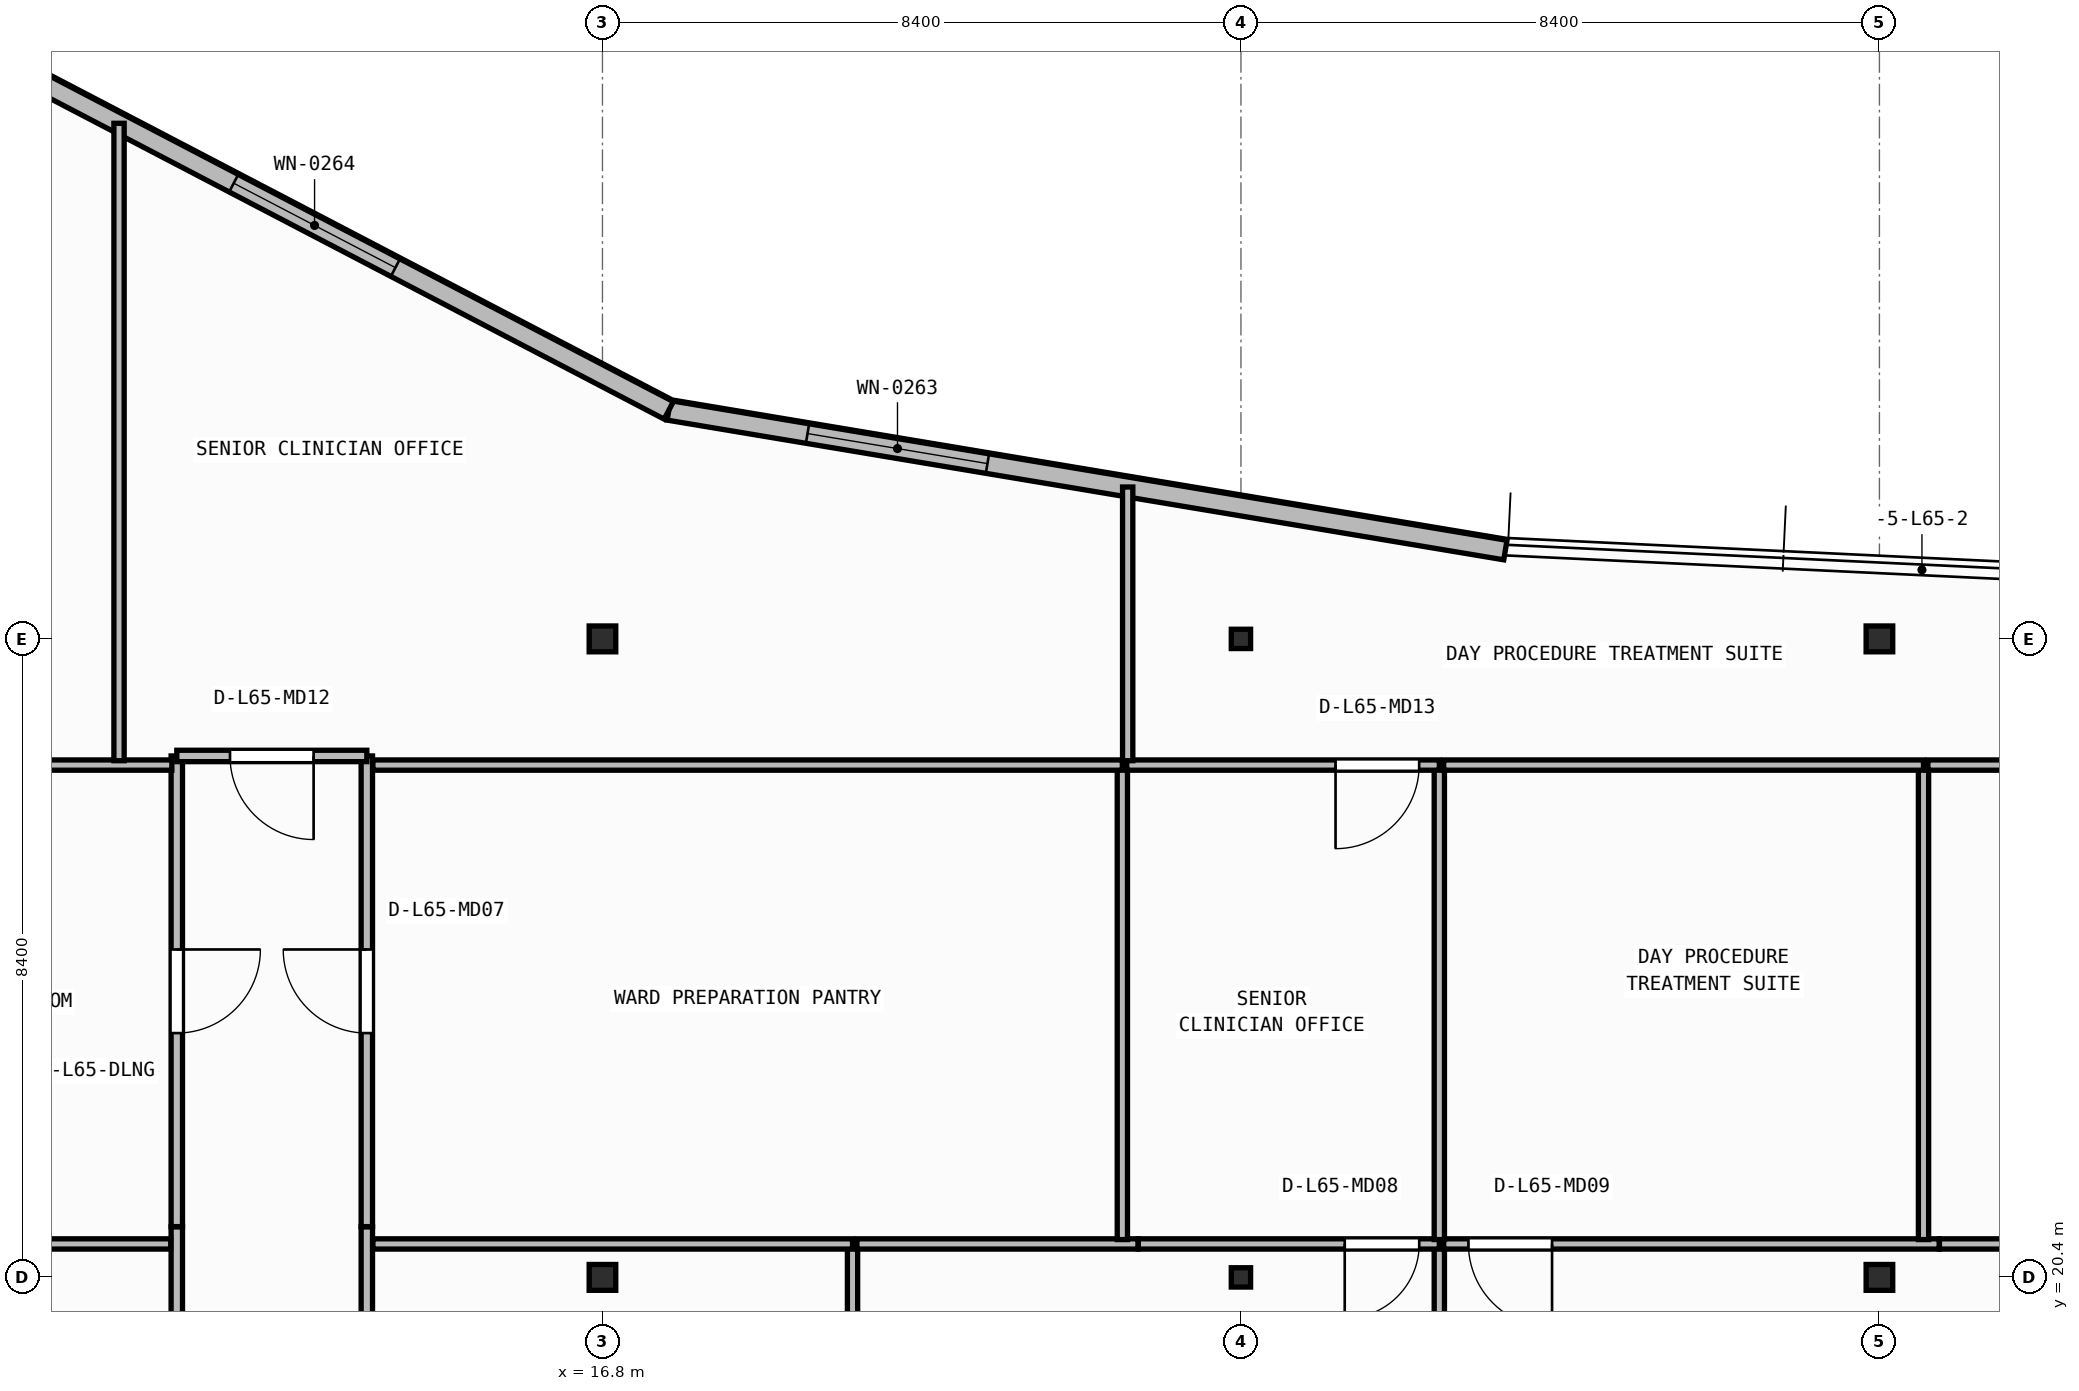
"""IFC4 building model, lengths in metres.
Left out: names, types, materials, properties, quantities, classifications, styles, units other than length and angle.
Written with IfcOpenShell. Run it as: python <this file> out.ifc"""

import sys

from ifc_helpers import new_model, si_unit, direction, frame, frame_2d, origin, origin_2d, place, context, subcontext, project, spatial, rectangle, i_section, extrude, element, fill, save


model = new_model("IFC4")
c1 = context("Model", 3, precision=1e-05, world=origin(), true_north=direction((0.0, 1.0)))
c2 = subcontext(c1, "Body", "Model", "MODEL_VIEW")
j1 = project(units=[si_unit("LENGTHUNIT", "METRE"), si_unit("PLANEANGLEUNIT", "RADIAN")], contexts=[c1])
p1 = place(None, origin())
s1 = spatial("IfcSite", under=j1, at=p1, CompositionType="ELEMENT")
p2 = place(p1, origin())
s2 = spatial("IfcBuilding", under=s1, at=p2, CompositionType="ELEMENT")
p3 = place(p2, frame((0.0, 0.0, 264.45)))
s3 = spatial("IfcBuildingStorey", under=s2, at=p3, CompositionType="ELEMENT", Elevation=264.45)
p4 = place(p3, frame((16.8, 20.4, 0.0), z_axis=(0.0, 0.0, 1.0), x_axis=(1.0, 0.0, 0.0)))
e1 = element("IfcColumn", 1, at=p4, inside=s3, PredefinedType="COLUMN", context=c2, shape_type="SweptSolid", body=[
    extrude(i_section(OverallWidth=0.35, OverallDepth=0.34, WebThickness=0.016, FlangeThickness=0.028, at=origin_2d()), origin(), (0.0, 0.0, 1.0), 3.95),
])
p5 = place(p3, frame((25.2, 20.4, 0.0), z_axis=(0.0, 0.0, 1.0), x_axis=(1.0, 0.0, 0.0)))
e2 = element("IfcColumn", 2, at=p5, inside=s3, PredefinedType="COLUMN", context=c2, shape_type="SweptSolid", body=[
    extrude(i_section(OverallWidth=0.254, OverallDepth=0.254, WebThickness=0.009, FlangeThickness=0.014, FilletRadius=0.013, at=origin_2d()), origin(), (0.0, 0.0, 1.0), 3.95),
])
for number, where, z_axis, x_axis in (
    (3, (33.6, 20.4, 0.0), (0.0, 0.0, 1.0), (1.0, 0.0, 0.0)),
    (4, (16.8, 28.8, 0.0), (0.0, 0.0, 1.0), (1.0, 0.0, 0.0)),
):
    element("IfcColumn", number, at=place(p3, frame(where, z_axis=z_axis, x_axis=x_axis)), inside=s3, PredefinedType="COLUMN", context=c2, shape_type="SweptSolid", body=[
        extrude(i_section(OverallWidth=0.35, OverallDepth=0.34, WebThickness=0.016, FlangeThickness=0.028, at=origin_2d()), origin(), (0.0, 0.0, 1.0), 3.95),
    ])
p6 = place(p3, frame((25.2, 28.8, 0.0), z_axis=(0.0, 0.0, 1.0), x_axis=(1.0, 0.0, 0.0)))
e5 = element("IfcColumn", 5, at=p6, inside=s3, PredefinedType="COLUMN", context=c2, shape_type="SweptSolid", body=[
    extrude(i_section(OverallWidth=0.254, OverallDepth=0.254, WebThickness=0.009, FlangeThickness=0.014, FilletRadius=0.013, at=origin_2d()), origin(), (0.0, 0.0, 1.0), 3.95),
])
p7 = place(p3, frame((33.6, 28.8, 0.0), z_axis=(0.0, 0.0, 1.0), x_axis=(1.0, 0.0, 0.0)))
e6 = element("IfcColumn", 6, at=p7, inside=s3, PredefinedType="COLUMN", context=c2, shape_type="SweptSolid", body=[
    extrude(i_section(OverallWidth=0.35, OverallDepth=0.34, WebThickness=0.016, FlangeThickness=0.028, at=origin_2d()), origin(), (0.0, 0.0, 1.0), 3.95),
])
p8 = place(p3, frame((28.679, 29.969, 0.0), z_axis=(0.0, 0.0, 1.0), x_axis=(-0.986343023061, 0.164704100918, 0.0)))
e7 = element("IfcWall", 7, at=p8, inside=s3, PredefinedType="STANDARD", context=c2, shape_type="SweptSolid", body=[
    extrude(rectangle(XDim=11.159, YDim=0.26, at=frame_2d((5.579, 0.0))), origin(), (0.0, 0.0, 1.0), 3.71),
])
p9 = place(p8, frame((6.908, 0.0, 0.9)))
e8 = element("IfcOpeningElement", 8, at=p9, cuts=e7, PredefinedType="OPENING", context=c2, shape_type="SweptSolid", body=[
    extrude(rectangle(XDim=2.4, YDim=1.65, at=frame_2d((1.2, 0.825))), frame((0.0, 0.14, 0.0), z_axis=(0.0, -1.0, 0.0), x_axis=(1.0, 0.0, 0.0)), (0.0, 0.0, 1.0), 0.28),
])
p10 = place(p3, frame((17.673, 31.806, 0.0), z_axis=(0.0, 0.0, 1.0), x_axis=(-0.886426635565, 0.462869117311, 0.0)))
e9 = element("IfcWall", 9, at=p10, inside=s3, PredefinedType="STANDARD", context=c2, shape_type="SweptSolid", body=[
    extrude(rectangle(XDim=10.514, YDim=0.26, at=frame_2d((5.257, 0.0))), origin(), (0.0, 0.0, 1.0), 3.71),
])
p11 = place(p10, frame((4.057, 0.0, 0.9)))
e10 = element("IfcOpeningElement", 10, at=p11, cuts=e9, PredefinedType="OPENING", context=c2, shape_type="SweptSolid", body=[
    extrude(rectangle(XDim=2.4, YDim=1.65, at=frame_2d((1.2, 0.825))), frame((0.0, 0.14, 0.0), z_axis=(0.0, -1.0, 0.0), x_axis=(1.0, 0.0, 0.0)), (0.0, 0.0, 1.0), 0.28),
])
for number, where, z_axis, x_axis in (
    (11, (11.2, 21.066, 0.0), (0.0, 0.0, 1.0), (0.0, -1.0, 0.0)),
    (12, (13.7, 14.7, 0.0), (0.0, 0.0, 1.0), (0.0, 1.0, 0.0)),
):
    element("IfcWall", number, at=place(p3, frame(where, z_axis=z_axis, x_axis=x_axis)), inside=s3, PredefinedType="PARTITIONING", context=c2, shape_type="SweptSolid", body=[
        extrude(rectangle(XDim=6.366, YDim=0.15, at=frame_2d((3.183, 0.0))), origin(), (0.0, 0.0, 1.0), 3.71),
    ])
p12 = place(p3, frame((11.2, 27.26, 0.0), z_axis=(0.0, 0.0, 1.0), x_axis=(0.0, -1.0, 0.0)))
e13 = element("IfcWall", 13, at=p12, inside=s3, PredefinedType="PARTITIONING", context=c2, shape_type="SweptSolid", body=[
    extrude(rectangle(XDim=6.192, YDim=0.15, at=frame_2d((3.096, 0.0))), origin(), (0.0, 0.0, 1.0), 3.71),
])
p13 = place(p12, frame((2.546, 0.0, 0.0)))
e14 = element("IfcOpeningElement", 14, at=p13, cuts=e13, PredefinedType="OPENING", context=c2, shape_type="SweptSolid", body=[
    extrude(rectangle(XDim=1.1, YDim=2.1, at=frame_2d((0.55, 1.05))), frame((0.0, 0.085, 0.0), z_axis=(0.0, -1.0, 0.0), x_axis=(1.0, 0.0, 0.0)), (0.0, 0.0, 1.0), 0.17),
])
p14 = place(p3, frame((13.7, 21.068, 0.0), z_axis=(0.0, 0.0, 1.0), x_axis=(0.0, 1.0, 0.0)))
e15 = element("IfcWall", 15, at=p14, inside=s3, PredefinedType="PARTITIONING", context=c2, shape_type="SweptSolid", body=[
    extrude(rectangle(XDim=6.192, YDim=0.15, at=frame_2d((3.096, 0.0))), origin(), (0.0, 0.0, 1.0), 3.71),
])
p15 = place(p14, frame((2.546, 0.0, 0.0)))
e16 = element("IfcOpeningElement", 16, at=p15, cuts=e15, PredefinedType="OPENING", context=c2, shape_type="SweptSolid", body=[
    extrude(rectangle(XDim=1.1, YDim=2.1, at=frame_2d((0.55, 1.05))), frame((0.0, 0.085, 0.0), z_axis=(0.0, -1.0, 0.0), x_axis=(1.0, 0.0, 0.0)), (0.0, 0.0, 1.0), 0.17),
])
p16 = place(p3, frame((13.7, 27.26, 0.0), z_axis=(0.0, 0.0, 1.0), x_axis=(-1.0, 0.0, 0.0)))
e17 = element("IfcWall", 17, at=p16, inside=s3, PredefinedType="PARTITIONING", context=c2, shape_type="SweptSolid", body=[
    extrude(rectangle(XDim=2.5, YDim=0.15, at=frame_2d((1.25, 0.0))), origin(), (0.0, 0.0, 1.0), 3.71),
])
p17 = place(p16, frame((0.7, 0.0, 0.0)))
e18 = element("IfcOpeningElement", 18, at=p17, cuts=e17, PredefinedType="OPENING", context=c2, shape_type="SweptSolid", body=[
    extrude(rectangle(XDim=1.1, YDim=2.1, at=frame_2d((0.55, 1.05))), frame((0.0, 0.085, 0.0), z_axis=(0.0, -1.0, 0.0), x_axis=(1.0, 0.0, 0.0)), (0.0, 0.0, 1.0), 0.17),
])
p18 = place(p3, frame((11.12, 20.84, 0.0), z_axis=(0.0, 0.0, 1.0), x_axis=(-1.0, 0.0, 0.0)))
e19 = element("IfcWall", 19, at=p18, inside=s3, PredefinedType="PARTITIONING", context=c2, shape_type="SweptSolid", body=[
    extrude(rectangle(XDim=4.303, YDim=0.135, at=frame_2d((2.151, 0.0))), origin(), (0.0, 0.0, 1.0), 3.157),
])
p19 = place(p3, frame((20.09, 14.76, 0.0), z_axis=(0.0, 0.0, 1.0), x_axis=(0.0, 1.0, 0.0)))
e20 = element("IfcWall", 20, at=p19, inside=s3, PredefinedType="PARTITIONING", context=c2, shape_type="SweptSolid", body=[
    extrude(rectangle(XDim=6.08, YDim=0.135, at=frame_2d((3.04, 0.0))), origin(), (0.0, 0.0, 1.0), 3.71),
])
p20 = place(p3, frame((20.09, 20.84, 0.0), z_axis=(0.0, 0.0, 1.0), x_axis=(-1.0, 0.0, 0.0)))
e21 = element("IfcWall", 21, at=p20, inside=s3, PredefinedType="PARTITIONING", context=c2, shape_type="SweptSolid", body=[
    extrude(rectangle(XDim=6.31, YDim=0.135, at=frame_2d((3.155, 0.0))), origin(), (0.0, 0.0, 1.0), 3.157),
])
p21 = place(p3, frame((27.81, 14.76, 0.0), z_axis=(0.0, 0.0, 1.0), x_axis=(0.0, 1.0, 0.0)))
e22 = element("IfcWall", 22, at=p21, inside=s3, PredefinedType="PARTITIONING", context=c2, shape_type="SweptSolid", body=[
    extrude(rectangle(XDim=6.08, YDim=0.135, at=frame_2d((3.04, 0.0))), origin(), (0.0, 0.0, 1.0), 3.71),
])
p22 = place(p3, frame((23.847, 20.84, 0.0), z_axis=(0.0, 0.0, 1.0), x_axis=(-1.0, 0.0, 0.0)))
e23 = element("IfcWall", 23, at=p22, inside=s3, PredefinedType="PARTITIONING", context=c2, shape_type="SweptSolid", body=[
    extrude(rectangle(XDim=3.7, YDim=0.135, at=frame_2d((1.85, 0.0))), origin(), (0.0, 0.0, 1.0), 3.157),
])
p23 = place(p3, frame((27.81, 20.84, 0.0), z_axis=(0.0, 0.0, 1.0), x_axis=(-1.0, 0.0, 0.0)))
e24 = element("IfcWall", 24, at=p23, inside=s3, PredefinedType="PARTITIONING", context=c2, shape_type="SweptSolid", body=[
    extrude(rectangle(XDim=3.96, YDim=0.135, at=frame_2d((1.98, 0.0))), origin(), (0.0, 0.0, 1.0), 3.157),
])
p24 = place(p23, frame((0.264, 0.0, 0.0)))
e25 = element("IfcOpeningElement", 25, at=p24, cuts=e24, PredefinedType="OPENING", context=c2, shape_type="SweptSolid", body=[
    extrude(rectangle(XDim=0.98, YDim=2.1, at=frame_2d((0.49, 1.05))), frame((0.0, 0.077, 0.0), z_axis=(0.0, -1.0, 0.0), x_axis=(1.0, 0.0, 0.0)), (0.0, 0.0, 1.0), 0.155),
])
p25 = place(p3, frame((34.387, 20.84, 0.0), z_axis=(0.0, 0.0, 1.0), x_axis=(-1.0, 0.0, 0.0)))
e26 = element("IfcWall", 26, at=p25, inside=s3, PredefinedType="PARTITIONING", context=c2, shape_type="SweptSolid", body=[
    extrude(rectangle(XDim=6.52, YDim=0.135, at=frame_2d((3.26, 0.0))), origin(), (0.0, 0.0, 1.0), 3.157),
])
p26 = place(p25, frame((5.094, 0.0, 0.0)))
e27 = element("IfcOpeningElement", 27, at=p26, cuts=e26, PredefinedType="OPENING", context=c2, shape_type="SweptSolid", body=[
    extrude(rectangle(XDim=1.1, YDim=2.1, at=frame_2d((0.55, 1.05))), frame((0.0, 0.077, 0.0), z_axis=(0.0, -1.0, 0.0), x_axis=(1.0, 0.0, 0.0)), (0.0, 0.0, 1.0), 0.155),
])
p27 = place(p3, frame((37.73, 20.84, 0.0), z_axis=(0.0, 0.0, 1.0), x_axis=(-1.0, 0.0, 0.0)))
e28 = element("IfcWall", 28, at=p27, inside=s3, PredefinedType="PARTITIONING", context=c2, shape_type="SweptSolid", body=[
    extrude(rectangle(XDim=3.341, YDim=0.135, at=frame_2d((1.67, 0.0))), origin(), (0.0, 0.0, 1.0), 3.71),
])
p28 = place(p27, frame((0.246, 0.0, 0.0)))
e29 = element("IfcOpeningElement", 29, at=p28, cuts=e28, PredefinedType="OPENING", context=c2, shape_type="SweptSolid", body=[
    extrude(rectangle(XDim=1.1, YDim=2.1, at=frame_2d((0.55, 1.05))), frame((0.0, 0.077, 0.0), z_axis=(0.0, -1.0, 0.0), x_axis=(1.0, 0.0, 0.0)), (0.0, 0.0, 1.0), 0.155),
])
p29 = place(p3, frame((11.135, 27.14, 0.0), z_axis=(0.0, 0.0, 1.0), x_axis=(-1.0, 0.0, 0.0)))
e30 = element("IfcWall", 30, at=p29, inside=s3, PredefinedType="PARTITIONING", context=c2, shape_type="SweptSolid", body=[
    extrude(rectangle(XDim=10.895, YDim=0.135, at=frame_2d((5.448, 0.0))), origin(), (0.0, 0.0, 1.0), 3.71),
])
p30 = place(p29, frame((5.837, 0.0, 0.0)))
e31 = element("IfcOpeningElement", 31, at=p30, cuts=e30, PredefinedType="OPENING", context=c2, shape_type="SweptSolid", body=[
    extrude(rectangle(XDim=1.1, YDim=2.1, at=frame_2d((0.55, 1.05))), frame((0.0, 0.077, 0.0), z_axis=(0.0, -1.0, 0.0), x_axis=(1.0, 0.0, 0.0)), (0.0, 0.0, 1.0), 0.155),
])
p31 = place(p3, frame((23.64, 20.897, 0.0), z_axis=(0.0, 0.0, 1.0), x_axis=(0.0, 1.0, 0.0)))
e32 = element("IfcWall", 32, at=p31, inside=s3, PredefinedType="PARTITIONING", context=c2, shape_type="SweptSolid", body=[
    extrude(rectangle(XDim=6.242, YDim=0.135, at=frame_2d((3.121, 0.0))), origin(), (0.0, 0.0, 1.0), 3.71),
])
p32 = place(p3, frame((23.64, 27.14, 0.0), z_axis=(0.0, 0.0, 1.0), x_axis=(-1.0, 0.0, 0.0)))
e33 = element("IfcWall", 33, at=p32, inside=s3, PredefinedType="PARTITIONING", context=c2, shape_type="SweptSolid", body=[
    extrude(rectangle(XDim=9.86, YDim=0.135, at=frame_2d((4.93, 0.0))), origin(), (0.0, 0.0, 1.0), 3.71),
])
p33 = place(p3, frame((27.81, 20.897, 0.0), z_axis=(0.0, 0.0, 1.0), x_axis=(0.0, 1.0, 0.0)))
e34 = element("IfcWall", 34, at=p33, inside=s3, PredefinedType="PARTITIONING", context=c2, shape_type="SweptSolid", body=[
    extrude(rectangle(XDim=6.242, YDim=0.135, at=frame_2d((3.121, 0.0))), origin(), (0.0, 0.0, 1.0), 3.71),
])
p34 = place(p3, frame((27.81, 27.14, 0.0), z_axis=(0.0, 0.0, 1.0), x_axis=(-1.0, 0.0, 0.0)))
e35 = element("IfcWall", 35, at=p34, inside=s3, PredefinedType="PARTITIONING", context=c2, shape_type="SweptSolid", body=[
    extrude(rectangle(XDim=4.113, YDim=0.135, at=frame_2d((2.056, 0.0))), origin(), (0.0, 0.0, 1.0), 3.71),
])
p35 = place(p34, frame((0.265, 0.0, 0.0)))
e36 = element("IfcOpeningElement", 36, at=p35, cuts=e35, PredefinedType="OPENING", context=c2, shape_type="SweptSolid", body=[
    extrude(rectangle(XDim=1.1, YDim=2.1, at=frame_2d((0.55, 1.05))), frame((0.0, 0.077, 0.0), z_axis=(0.0, -1.0, 0.0), x_axis=(1.0, 0.0, 0.0)), (0.0, 0.0, 1.0), 0.155),
])
p36 = place(p3, frame((34.18, 20.897, 0.0), z_axis=(0.0, 0.0, 1.0), x_axis=(0.0, 1.0, 0.0)))
e37 = element("IfcWall", 37, at=p36, inside=s3, PredefinedType="PARTITIONING", context=c2, shape_type="SweptSolid", body=[
    extrude(rectangle(XDim=6.242, YDim=0.135, at=frame_2d((3.121, 0.0))), origin(), (0.0, 0.0, 1.0), 3.71),
])
p37 = place(p3, frame((34.18, 27.14, 0.0), z_axis=(0.0, 0.0, 1.0), x_axis=(-1.0, 0.0, 0.0)))
e38 = element("IfcWall", 38, at=p37, inside=s3, PredefinedType="PARTITIONING", context=c2, shape_type="SweptSolid", body=[
    extrude(rectangle(XDim=6.312, YDim=0.135, at=frame_2d((3.156, 0.0))), origin(), (0.0, 0.0, 1.0), 3.71),
])
p38 = place(p3, frame((39.638, 27.14, 0.0), z_axis=(0.0, 0.0, 1.0), x_axis=(-1.0, 0.0, 0.0)))
e39 = element("IfcWall", 39, at=p38, inside=s3, PredefinedType="PARTITIONING", context=c2, shape_type="SweptSolid", body=[
    extrude(rectangle(XDim=5.4, YDim=0.135, at=frame_2d((2.7, 0.0))), origin(), (0.0, 0.0, 1.0), 3.71),
])
p39 = place(p3, frame((10.44, 27.198, 0.0), z_axis=(0.0, 0.0, 1.0), x_axis=(0.0, 1.0, 0.0)))
e40 = element("IfcWall", 40, at=p39, inside=s3, PredefinedType="PARTITIONING", context=c2, shape_type="SweptSolid", body=[
    extrude(rectangle(XDim=8.385, YDim=0.135, at=frame_2d((4.193, 0.0))), origin(), (0.0, 0.0, 1.0), 3.71),
])
p40 = place(p3, frame((23.71, 27.198, 0.0), z_axis=(0.0, 0.0, 1.0), x_axis=(0.0, 1.0, 0.0)))
e41 = element("IfcWall", 41, at=p40, inside=s3, PredefinedType="PARTITIONING", context=c2, shape_type="SweptSolid", body=[
    extrude(rectangle(XDim=3.601, YDim=0.135, at=frame_2d((1.8, 0.0))), origin(), (0.0, 0.0, 1.0), 3.71),
])
p41 = place(p9, origin())
e42 = element("IfcWindow", 42, at=p41, inside=s3, PartitioningType="SINGLE_PANEL", PredefinedType="WINDOW", context=c2, shape_type="SweptSolid", body=[
    extrude(rectangle(XDim=2.4, YDim=1.65, at=frame_2d((1.2, 0.825))), frame((0.0, 0.03, 0.0), z_axis=(0.0, -1.0, 0.0), x_axis=(1.0, 0.0, 0.0)), (0.0, 0.0, 1.0), 0.06),
])
fill(e8, e42)
p42 = place(p11, origin())
e43 = element("IfcWindow", 43, at=p42, inside=s3, PartitioningType="SINGLE_PANEL", PredefinedType="WINDOW", context=c2, shape_type="SweptSolid", body=[
    extrude(rectangle(XDim=2.4, YDim=1.65, at=frame_2d((1.2, 0.825))), frame((0.0, 0.03, 0.0), z_axis=(0.0, -1.0, 0.0), x_axis=(1.0, 0.0, 0.0)), (0.0, 0.0, 1.0), 0.06),
])
fill(e10, e43)
p43 = place(p13, origin())
e44 = element("IfcDoor", 44, at=p43, inside=s3, OperationType="SINGLE_SWING_LEFT", PredefinedType="DOOR", context=c2, shape_type="SweptSolid", body=[
    extrude(rectangle(XDim=1.1, YDim=2.1, at=frame_2d((0.55, 1.05))), frame((0.0, 0.025, 0.0), z_axis=(0.0, -1.0, 0.0), x_axis=(1.0, 0.0, 0.0)), (0.0, 0.0, 1.0), 0.05),
])
fill(e14, e44)
p44 = place(p15, origin())
e45 = element("IfcDoor", 45, at=p44, inside=s3, OperationType="SINGLE_SWING_RIGHT", PredefinedType="DOOR", context=c2, shape_type="SweptSolid", body=[
    extrude(rectangle(XDim=1.1, YDim=2.1, at=frame_2d((0.55, 1.05))), frame((0.0, 0.025, 0.0), z_axis=(0.0, -1.0, 0.0), x_axis=(1.0, 0.0, 0.0)), (0.0, 0.0, 1.0), 0.05),
])
fill(e16, e45)
p45 = place(p17, origin())
e46 = element("IfcDoor", 46, at=p45, inside=s3, OperationType="SINGLE_SWING_LEFT", PredefinedType="DOOR", context=c2, shape_type="SweptSolid", body=[
    extrude(rectangle(XDim=1.1, YDim=2.1, at=frame_2d((0.55, 1.05))), frame((0.0, 0.025, 0.0), z_axis=(0.0, -1.0, 0.0), x_axis=(1.0, 0.0, 0.0)), (0.0, 0.0, 1.0), 0.05),
])
fill(e18, e46)
p46 = place(p24, origin())
e47 = element("IfcDoor", 47, at=p46, inside=s3, OperationType="SINGLE_SWING_RIGHT", PredefinedType="DOOR", context=c2, shape_type="SweptSolid", body=[
    extrude(rectangle(XDim=0.98, YDim=2.1, at=frame_2d((0.49, 1.05))), frame((0.0, 0.025, 0.0), z_axis=(0.0, -1.0, 0.0), x_axis=(1.0, 0.0, 0.0)), (0.0, 0.0, 1.0), 0.05),
])
fill(e25, e47)
p47 = place(p26, origin())
e48 = element("IfcDoor", 48, at=p47, inside=s3, OperationType="SINGLE_SWING_LEFT", PredefinedType="DOOR", context=c2, shape_type="SweptSolid", body=[
    extrude(rectangle(XDim=1.1, YDim=2.1, at=frame_2d((0.55, 1.05))), frame((0.0, 0.025, 0.0), z_axis=(0.0, -1.0, 0.0), x_axis=(1.0, 0.0, 0.0)), (0.0, 0.0, 1.0), 0.05),
])
fill(e27, e48)
p48 = place(p35, origin())
e49 = element("IfcDoor", 49, at=p48, inside=s3, OperationType="SINGLE_SWING_RIGHT", PredefinedType="DOOR", context=c2, shape_type="SweptSolid", body=[
    extrude(rectangle(XDim=1.1, YDim=2.1, at=frame_2d((0.55, 1.05))), frame((0.0, 0.025, 0.0), z_axis=(0.0, -1.0, 0.0), x_axis=(1.0, 0.0, 0.0)), (0.0, 0.0, 1.0), 0.05),
])
fill(e36, e49)
save(model, sys.argv[1])
